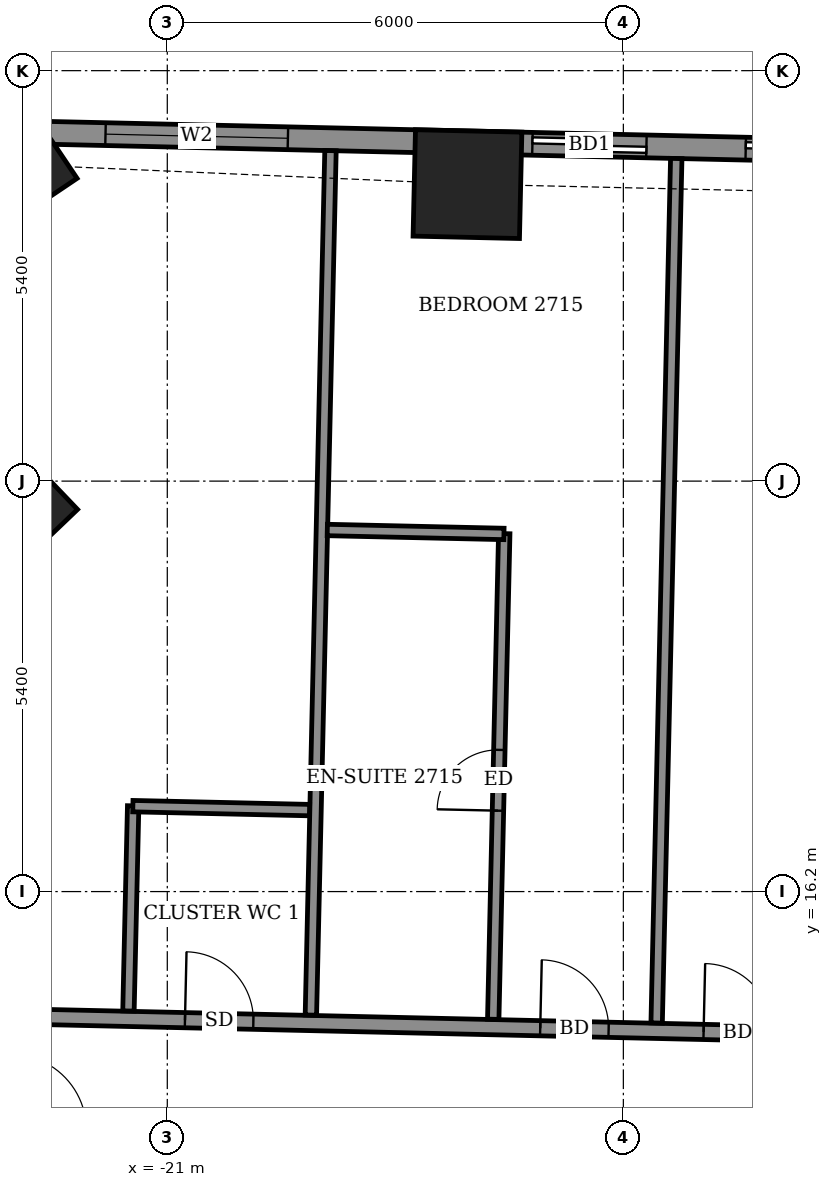
"""IFC4 building model, lengths in metres.
Left out: names, types, materials, properties, quantities, classifications, styles, units other than length and angle.
Written with IfcOpenShell. Run it as: python <this file> out.ifc"""

import sys

from ifc_helpers import new_model, si_unit, direction, frame, frame_2d, origin, origin_2d, place, context, subcontext, project, spatial, rectangle, extrude, element, fill, save


model = new_model("IFC4")
c1 = context("Model", 3, precision=1e-05, world=origin(), true_north=direction((0.0, 1.0)))
c2 = subcontext(c1, "Body", "Model", "MODEL_VIEW")
j1 = project(units=[si_unit("LENGTHUNIT", "METRE"), si_unit("PLANEANGLEUNIT", "RADIAN")], contexts=[c1])
p1 = place(None, origin())
s1 = spatial("IfcSite", under=j1, at=p1, CompositionType="ELEMENT")
p2 = place(p1, origin())
s2 = spatial("IfcBuilding", under=s1, at=p2, CompositionType="ELEMENT")
p3 = place(p2, frame((0.0, 0.0, 109.1)))
s3 = spatial("IfcBuildingStorey", under=s2, at=p3, CompositionType="ELEMENT", Elevation=109.1)
for number, where, z_axis, x_axis in (
    (1, (-17.051, 25.507, -0.55), (0.0, 0.0, 1.0), (-1.0, 0.023, 0.0)),
    (2, (-23.158, 25.773, -0.55), (0.0, 0.0, 1.0), (-0.83, -0.558, 0.0)),
    (3, (-23.17, 21.25, -0.55), (0.0, 0.0, 1.0), (-0.723, -0.691, 0.0)),
):
    element("IfcColumn", number, at=place(p3, frame(where, z_axis=z_axis, x_axis=x_axis)), inside=s3, PredefinedType="COLUMN", context=c2, shape_type="SweptSolid", body=[
        extrude(rectangle(XDim=1.4, YDim=1.4, at=origin_2d()), origin(), (0.0, 0.0, 1.0), 3.6),
    ])
p4 = place(p3, frame((21.894, 25.173, 0.0), z_axis=(0.0, 0.0, 1.0), x_axis=(-0.999742661083, 0.022685052594, 0.0)))
e4 = element("IfcWall", 4, at=p4, inside=s3, PredefinedType="SOLIDWALL", context=c2, shape_type="SweptSolid", body=[
    extrude(rectangle(XDim=45.309, YDim=0.3, at=frame_2d((22.654, 0.0))), origin(), (0.0, 0.0, 1.0), 3.05),
])
p5 = place(p4, frame((2.319, 0.0, 0.0)))
e5 = element("IfcOpeningElement", 5, at=p5, cuts=e4, PredefinedType="OPENING", context=c2, shape_type="SweptSolid", body=[
    extrude(rectangle(XDim=1.5, YDim=2.4, at=frame_2d((0.75, 1.2))), frame((0.0, 0.16, 0.0), z_axis=(0.0, -1.0, 0.0), x_axis=(1.0, 0.0, 0.0)), (0.0, 0.0, 1.0), 0.32),
])
p6 = place(p4, frame((7.437, 0.0, 0.0)))
e6 = element("IfcOpeningElement", 6, at=p6, cuts=e4, PredefinedType="OPENING", context=c2, shape_type="SweptSolid", body=[
    extrude(rectangle(XDim=1.5, YDim=2.4, at=frame_2d((0.75, 1.2))), frame((0.0, 0.16, 0.0), z_axis=(0.0, -1.0, 0.0), x_axis=(1.0, 0.0, 0.0)), (0.0, 0.0, 1.0), 0.32),
])
p7 = place(p4, frame((10.244, 0.0, 0.0)))
e7 = element("IfcOpeningElement", 7, at=p7, cuts=e4, PredefinedType="OPENING", context=c2, shape_type="SweptSolid", body=[
    extrude(rectangle(XDim=1.5, YDim=2.4, at=frame_2d((0.75, 1.2))), frame((0.0, 0.16, 0.0), z_axis=(0.0, -1.0, 0.0), x_axis=(1.0, 0.0, 0.0)), (0.0, 0.0, 1.0), 0.32),
])
p8 = place(p4, frame((15.583, 0.0, 0.0)))
e8 = element("IfcOpeningElement", 8, at=p8, cuts=e4, PredefinedType="OPENING", context=c2, shape_type="SweptSolid", body=[
    extrude(rectangle(XDim=1.5, YDim=2.4, at=frame_2d((0.75, 1.2))), frame((0.0, 0.16, 0.0), z_axis=(0.0, -1.0, 0.0), x_axis=(1.0, 0.0, 0.0)), (0.0, 0.0, 1.0), 0.32),
])
p9 = place(p4, frame((20.677, 0.0, 0.0)))
e9 = element("IfcOpeningElement", 9, at=p9, cuts=e4, PredefinedType="OPENING", context=c2, shape_type="SweptSolid", body=[
    extrude(rectangle(XDim=1.5, YDim=2.4, at=frame_2d((0.75, 1.2))), frame((0.0, 0.16, 0.0), z_axis=(0.0, -1.0, 0.0), x_axis=(1.0, 0.0, 0.0)), (0.0, 0.0, 1.0), 0.32),
])
p10 = place(p4, frame((23.485, 0.0, 0.0)))
e10 = element("IfcOpeningElement", 10, at=p10, cuts=e4, PredefinedType="OPENING", context=c2, shape_type="SweptSolid", body=[
    extrude(rectangle(XDim=1.5, YDim=2.4, at=frame_2d((0.75, 1.2))), frame((0.0, 0.16, 0.0), z_axis=(0.0, -1.0, 0.0), x_axis=(1.0, 0.0, 0.0)), (0.0, 0.0, 1.0), 0.32),
])
p11 = place(p4, frame((28.708, 0.0, 0.0)))
e11 = element("IfcOpeningElement", 11, at=p11, cuts=e4, PredefinedType="OPENING", context=c2, shape_type="SweptSolid", body=[
    extrude(rectangle(XDim=1.5, YDim=2.4, at=frame_2d((0.75, 1.2))), frame((0.0, 0.16, 0.0), z_axis=(0.0, -1.0, 0.0), x_axis=(1.0, 0.0, 0.0)), (0.0, 0.0, 1.0), 0.32),
])
p12 = place(p4, frame((33.793, 0.0, 0.0)))
e12 = element("IfcOpeningElement", 12, at=p12, cuts=e4, PredefinedType="OPENING", context=c2, shape_type="SweptSolid", body=[
    extrude(rectangle(XDim=1.5, YDim=2.4, at=frame_2d((0.75, 1.2))), frame((0.0, 0.16, 0.0), z_axis=(0.0, -1.0, 0.0), x_axis=(1.0, 0.0, 0.0)), (0.0, 0.0, 1.0), 0.32),
])
p13 = place(p4, frame((36.6, 0.0, 0.0)))
e13 = element("IfcOpeningElement", 13, at=p13, cuts=e4, PredefinedType="OPENING", context=c2, shape_type="SweptSolid", body=[
    extrude(rectangle(XDim=1.5, YDim=2.4, at=frame_2d((0.75, 1.2))), frame((0.0, 0.16, 0.0), z_axis=(0.0, -1.0, 0.0), x_axis=(1.0, 0.0, 0.0)), (0.0, 0.0, 1.0), 0.32),
])
p14 = place(p4, frame((41.318, 0.0, 0.9)))
e14 = element("IfcOpeningElement", 14, at=p14, cuts=e4, PredefinedType="OPENING", context=c2, shape_type="SweptSolid", body=[
    extrude(rectangle(XDim=2.4, YDim=1.5, at=frame_2d((1.2, 0.75))), frame((0.0, 0.16, 0.0), z_axis=(0.0, -1.0, 0.0), x_axis=(1.0, 0.0, 0.0)), (0.0, 0.0, 1.0), 0.32),
])
p15 = place(p3, frame((-26.316, 14.634, 0.0), z_axis=(0.0, 0.0, 1.0), x_axis=(0.999742734556, -0.02268181435, 0.0)))
e15 = element("IfcWall", 15, at=p15, inside=s3, PredefinedType="PARTITIONING", context=c2, shape_type="SweptSolid", body=[
    extrude(rectangle(XDim=50.708, YDim=0.2, at=frame_2d((25.354, 0.0))), origin(), (0.0, 0.0, 1.0), 3.05),
])
p16 = place(p15, frame((48.229, 0.0, 0.0)))
e16 = element("IfcOpeningElement", 16, at=p16, cuts=e15, PredefinedType="OPENING", context=c2, shape_type="SweptSolid", body=[
    extrude(rectangle(XDim=1.0, YDim=2.1, at=frame_2d((0.5, 1.05))), frame((0.0, 0.11, 0.0), z_axis=(0.0, -1.0, 0.0), x_axis=(1.0, 0.0, 0.0)), (0.0, 0.0, 1.0), 0.22),
])
p17 = place(p15, frame((43.6, 0.0, 0.0)))
e17 = element("IfcOpeningElement", 17, at=p17, cuts=e15, PredefinedType="OPENING", context=c2, shape_type="SweptSolid", body=[
    extrude(rectangle(XDim=0.9, YDim=2.1, at=frame_2d((0.45, 1.05))), frame((0.0, 0.11, 0.0), z_axis=(0.0, -1.0, 0.0), x_axis=(1.0, 0.0, 0.0)), (0.0, 0.0, 1.0), 0.22),
])
p18 = place(p15, frame((38.925, 0.0, 0.0)))
e18 = element("IfcOpeningElement", 18, at=p18, cuts=e15, PredefinedType="OPENING", context=c2, shape_type="SweptSolid", body=[
    extrude(rectangle(XDim=0.9, YDim=2.1, at=frame_2d((0.45, 1.05))), frame((0.0, 0.11, 0.0), z_axis=(0.0, -1.0, 0.0), x_axis=(1.0, 0.0, 0.0)), (0.0, 0.0, 1.0), 0.22),
])
p19 = place(p15, frame((36.9, 0.0, 0.0)))
e19 = element("IfcOpeningElement", 19, at=p19, cuts=e15, PredefinedType="OPENING", context=c2, shape_type="SweptSolid", body=[
    extrude(rectangle(XDim=0.9, YDim=2.1, at=frame_2d((0.45, 1.05))), frame((0.0, 0.11, 0.0), z_axis=(0.0, -1.0, 0.0), x_axis=(1.0, 0.0, 0.0)), (0.0, 0.0, 1.0), 0.22),
])
p20 = place(p15, frame((29.975, 0.0, 0.0)))
e20 = element("IfcOpeningElement", 20, at=p20, cuts=e15, PredefinedType="OPENING", context=c2, shape_type="SweptSolid", body=[
    extrude(rectangle(XDim=0.9, YDim=2.1, at=frame_2d((0.45, 1.05))), frame((0.0, 0.11, 0.0), z_axis=(0.0, -1.0, 0.0), x_axis=(1.0, 0.0, 0.0)), (0.0, 0.0, 1.0), 0.22),
])
p21 = place(p15, frame((27.9, 0.0, 0.0)))
e21 = element("IfcOpeningElement", 21, at=p21, cuts=e15, PredefinedType="OPENING", context=c2, shape_type="SweptSolid", body=[
    extrude(rectangle(XDim=0.9, YDim=2.1, at=frame_2d((0.45, 1.05))), frame((0.0, 0.11, 0.0), z_axis=(0.0, -1.0, 0.0), x_axis=(1.0, 0.0, 0.0)), (0.0, 0.0, 1.0), 0.22),
])
p22 = place(p15, frame((21.175, 0.0, 0.0)))
e22 = element("IfcOpeningElement", 22, at=p22, cuts=e15, PredefinedType="OPENING", context=c2, shape_type="SweptSolid", body=[
    extrude(rectangle(XDim=0.9, YDim=2.1, at=frame_2d((0.45, 1.05))), frame((0.0, 0.11, 0.0), z_axis=(0.0, -1.0, 0.0), x_axis=(1.0, 0.0, 0.0)), (0.0, 0.0, 1.0), 0.22),
])
p23 = place(p15, frame((19.25, 0.0, 0.0)))
e23 = element("IfcOpeningElement", 23, at=p23, cuts=e15, PredefinedType="OPENING", context=c2, shape_type="SweptSolid", body=[
    extrude(rectangle(XDim=0.9, YDim=2.1, at=frame_2d((0.45, 1.05))), frame((0.0, 0.11, 0.0), z_axis=(0.0, -1.0, 0.0), x_axis=(1.0, 0.0, 0.0)), (0.0, 0.0, 1.0), 0.22),
])
p24 = place(p15, frame((12.375, 0.0, 0.0)))
e24 = element("IfcOpeningElement", 24, at=p24, cuts=e15, PredefinedType="OPENING", context=c2, shape_type="SweptSolid", body=[
    extrude(rectangle(XDim=0.9, YDim=2.1, at=frame_2d((0.45, 1.05))), frame((0.0, 0.11, 0.0), z_axis=(0.0, -1.0, 0.0), x_axis=(1.0, 0.0, 0.0)), (0.0, 0.0, 1.0), 0.22),
])
p25 = place(p15, frame((10.225, 0.0, 0.0)))
e25 = element("IfcOpeningElement", 25, at=p25, cuts=e15, PredefinedType="OPENING", context=c2, shape_type="SweptSolid", body=[
    extrude(rectangle(XDim=0.9, YDim=2.1, at=frame_2d((0.45, 1.05))), frame((0.0, 0.11, 0.0), z_axis=(0.0, -1.0, 0.0), x_axis=(1.0, 0.0, 0.0)), (0.0, 0.0, 1.0), 0.22),
])
p26 = place(p15, frame((0.85, 0.0, 0.0)))
e26 = element("IfcOpeningElement", 26, at=p26, cuts=e15, PredefinedType="OPENING", context=c2, shape_type="SweptSolid", body=[
    extrude(rectangle(XDim=1.0, YDim=2.1, at=frame_2d((0.5, 1.05))), frame((0.0, 0.11, 0.0), z_axis=(0.0, -1.0, 0.0), x_axis=(1.0, 0.0, 0.0)), (0.0, 0.0, 1.0), 0.22),
])
p27 = place(p15, frame((5.55, 0.0, 0.0)))
e27 = element("IfcOpeningElement", 27, at=p27, cuts=e15, PredefinedType="OPENING", context=c2, shape_type="SweptSolid", body=[
    extrude(rectangle(XDim=0.9, YDim=2.1, at=frame_2d((0.45, 1.05))), frame((0.0, 0.11, 0.0), z_axis=(0.0, -1.0, 0.0), x_axis=(1.0, 0.0, 0.0)), (0.0, 0.0, 1.0), 0.22),
])
p28 = place(p3, frame((-21.511, 14.629, 0.0), z_axis=(0.0, 0.0, 1.0), x_axis=(0.022969966847, 0.999736155505, 0.0)))
e28 = element("IfcWall", 28, at=p28, inside=s3, PredefinedType="PARTITIONING", context=c2, shape_type="SweptSolid", body=[
    extrude(rectangle(XDim=2.7, YDim=0.15, at=frame_2d((1.35, 0.0))), origin(), (0.0, 0.0, 1.0), 3.05),
])
p29 = place(p3, frame((-19.111, 14.575, 0.0), z_axis=(0.0, 0.0, 1.0), x_axis=(0.022684355347, 0.999742676904, 0.0)))
e29 = element("IfcWall", 29, at=p29, inside=s3, PredefinedType="PARTITIONING", context=c2, shape_type="SweptSolid", body=[
    extrude(rectangle(XDim=11.376, YDim=0.15, at=frame_2d((5.688, 0.0))), origin(), (0.0, 0.0, 1.0), 2.55),
])
p30 = place(p3, frame((-16.712, 14.52, 0.0), z_axis=(0.0, 0.0, 1.0), x_axis=(0.022692767652, 0.999742485991, 0.0)))
e30 = element("IfcWall", 30, at=p30, inside=s3, PredefinedType="PARTITIONING", context=c2, shape_type="SweptSolid", body=[
    extrude(rectangle(XDim=6.391, YDim=0.15, at=frame_2d((3.195, 0.0))), origin(), (0.0, 0.0, 1.0), 3.05),
])
p31 = place(p30, frame((2.745, 0.0, 0.0)))
e31 = element("IfcOpeningElement", 31, at=p31, cuts=e30, PredefinedType="OPENING", context=c2, shape_type="SweptSolid", body=[
    extrude(rectangle(XDim=0.8, YDim=2.1, at=frame_2d((0.4, 1.05))), frame((0.0, 0.085, 0.0), z_axis=(0.0, -1.0, 0.0), x_axis=(1.0, 0.0, 0.0)), (0.0, 0.0, 1.0), 0.17),
])
p32 = place(p3, frame((-14.562, 14.471, 0.0), z_axis=(0.0, 0.0, 1.0), x_axis=(0.022684355347, 0.999742676904, 0.0)))
e32 = element("IfcWall", 32, at=p32, inside=s3, PredefinedType="PARTITIONING", context=c2, shape_type="SweptSolid", body=[
    extrude(rectangle(XDim=11.376, YDim=0.15, at=frame_2d((5.688, 0.0))), origin(), (0.0, 0.0, 1.0), 2.55),
])
for number, where, z_axis, x_axis in (
    (33, (-21.453, 17.324, 0.0), (0.0, 0.0, 1.0), (1.0, -0.022, 0.0)),
    (34, (-18.895, 20.957, 0.0), (0.0, 0.0, 1.0), (1.0, -0.022, 0.0)),
):
    element("IfcWall", number, at=place(p3, frame(where, z_axis=z_axis, x_axis=x_axis)), inside=s3, PredefinedType="PARTITIONING", context=c2, shape_type="SweptSolid", body=[
        extrude(rectangle(XDim=2.324, YDim=0.15, at=frame_2d((1.162, 0.0))), origin(), (0.0, 0.0, 1.0), 3.05),
    ])
p33 = place(p12, origin())
e35 = element("IfcDoor", 35, at=p33, inside=s3, OperationType="SLIDING_TO_LEFT", PredefinedType="DOOR", context=c2, shape_type="SweptSolid", body=[
    extrude(rectangle(XDim=1.5, YDim=2.4, at=frame_2d((0.75, 1.2))), frame((0.0, 0.025, 0.0), z_axis=(0.0, -1.0, 0.0), x_axis=(1.0, 0.0, 0.0)), (0.0, 0.0, 1.0), 0.05),
])
fill(e12, e35)
p34 = place(p13, origin())
e36 = element("IfcDoor", 36, at=p34, inside=s3, OperationType="SLIDING_TO_LEFT", PredefinedType="DOOR", context=c2, shape_type="SweptSolid", body=[
    extrude(rectangle(XDim=1.5, YDim=2.4, at=frame_2d((0.75, 1.2))), frame((0.0, 0.025, 0.0), z_axis=(0.0, -1.0, 0.0), x_axis=(1.0, 0.0, 0.0)), (0.0, 0.0, 1.0), 0.05),
])
fill(e13, e36)
p35 = place(p14, origin())
e37 = element("IfcWindow", 37, at=p35, inside=s3, PartitioningType="DOUBLE_PANEL_VERTICAL", PredefinedType="WINDOW", context=c2, shape_type="SweptSolid", body=[
    extrude(rectangle(XDim=2.4, YDim=1.5, at=frame_2d((1.2, 0.75))), frame((0.0, 0.03, 0.0), z_axis=(0.0, -1.0, 0.0), x_axis=(1.0, 0.0, 0.0)), (0.0, 0.0, 1.0), 0.06),
])
fill(e14, e37)
p36 = place(p24, origin())
e38 = element("IfcDoor", 38, at=p36, inside=s3, OperationType="SINGLE_SWING_RIGHT", PredefinedType="DOOR", context=c2, shape_type="SweptSolid", body=[
    extrude(rectangle(XDim=0.9, YDim=2.1, at=frame_2d((0.45, 1.05))), frame((0.0, 0.025, 0.0), z_axis=(0.0, -1.0, 0.0), x_axis=(1.0, 0.0, 0.0)), (0.0, 0.0, 1.0), 0.05),
])
fill(e24, e38)
p37 = place(p25, origin())
e39 = element("IfcDoor", 39, at=p37, inside=s3, OperationType="SINGLE_SWING_LEFT", PredefinedType="DOOR", context=c2, shape_type="SweptSolid", body=[
    extrude(rectangle(XDim=0.9, YDim=2.1, at=frame_2d((0.45, 1.05))), frame((0.0, 0.025, 0.0), z_axis=(0.0, -1.0, 0.0), x_axis=(1.0, 0.0, 0.0)), (0.0, 0.0, 1.0), 0.05),
])
fill(e25, e39)
p38 = place(p31, origin())
e40 = element("IfcDoor", 40, at=p38, inside=s3, OperationType="SINGLE_SWING_LEFT", PredefinedType="DOOR", context=c2, shape_type="SweptSolid", body=[
    extrude(rectangle(XDim=0.8, YDim=2.1, at=frame_2d((0.4, 1.05))), frame((0.0, 0.025, 0.0), z_axis=(0.0, -1.0, 0.0), x_axis=(1.0, 0.0, 0.0)), (0.0, 0.0, 1.0), 0.05),
])
fill(e31, e40)
p39 = place(p27, origin())
e41 = element("IfcDoor", 41, at=p39, inside=s3, OperationType="SINGLE_SWING_LEFT", PredefinedType="DOOR", context=c2, shape_type="SweptSolid", body=[
    extrude(rectangle(XDim=0.9, YDim=2.1, at=frame_2d((0.45, 1.05))), frame((0.0, 0.025, 0.0), z_axis=(0.0, -1.0, 0.0), x_axis=(1.0, 0.0, 0.0)), (0.0, 0.0, 1.0), 0.05),
])
fill(e27, e41)
save(model, sys.argv[1])
